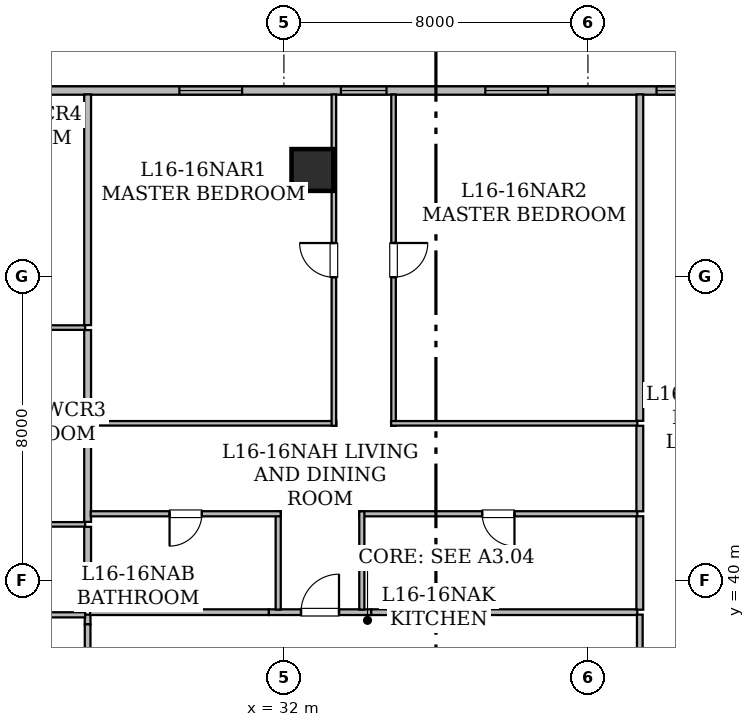
"""IFC4 building model, lengths in metres.
Left out: names, types, materials, properties, quantities, classifications, styles, units other than length and angle.
Written with IfcOpenShell. Run it as: python <this file> out.ifc"""

import sys

from ifc_helpers import new_model, si_unit, direction, frame, frame_2d, origin, origin_2d, place, context, subcontext, project, spatial, rectangle, hollow_rectangle, extrude, element, fill, save


model = new_model("IFC4")
c1 = context("Model", 3, precision=1e-05, world=origin(), true_north=direction((0.0, 1.0)))
c2 = subcontext(c1, "Body", "Model", "MODEL_VIEW")
j1 = project(units=[si_unit("LENGTHUNIT", "METRE"), si_unit("PLANEANGLEUNIT", "RADIAN")], contexts=[c1])
p1 = place(None, origin())
s1 = spatial("IfcSite", under=j1, at=p1, CompositionType="ELEMENT")
p2 = place(p1, origin())
s2 = spatial("IfcBuilding", under=s1, at=p2, CompositionType="ELEMENT")
p3 = place(p2, frame((0.0, 0.0, 66.15)))
s3 = spatial("IfcBuildingStorey", under=s2, at=p3, CompositionType="ELEMENT", Elevation=66.15)
p4 = place(p3, frame((32.75, 50.8, 0.0), z_axis=(0.0, 0.0, 1.0), x_axis=(1.0, 0.0, 0.0)))
e1 = element("IfcColumn", 1, at=p4, inside=s3, PredefinedType="COLUMN", context=c2, shape_type="SweptSolid", body=[
    extrude(hollow_rectangle(XDim=1.1, YDim=1.1, WallThickness=0.055, at=origin_2d()), origin(), (0.0, 0.0, 1.0), 3.65),
])
p5 = place(p3, frame((8.315, 52.89, 0.0), z_axis=(0.0, 0.0, 1.0), x_axis=(1.0, 0.0, 0.0)))
e2 = element("IfcWall", 2, at=p5, inside=s3, PredefinedType="STANDARD", context=c2, shape_type="SweptSolid", body=[
    extrude(rectangle(XDim=37.439, YDim=0.22, at=frame_2d((18.719, 0.0))), origin(), (0.0, 0.0, 1.0), 3.43),
])
p6 = place(p5, frame((5.093, 0.0, 0.85)))
e3 = element("IfcOpeningElement", 3, at=p6, cuts=e2, PredefinedType="OPENING", context=c2, shape_type="SweptSolid", body=[
    extrude(rectangle(XDim=1.65, YDim=1.55, at=frame_2d((0.825, 0.775))), frame((0.0, 0.12, 0.0), z_axis=(0.0, -1.0, 0.0), x_axis=(1.0, 0.0, 0.0)), (0.0, 0.0, 1.0), 0.24),
])
p7 = place(p5, frame((13.055, 0.0, 0.8)))
e4 = element("IfcOpeningElement", 4, at=p7, cuts=e2, PredefinedType="OPENING", context=c2, shape_type="SweptSolid", body=[
    extrude(rectangle(XDim=1.2, YDim=1.5, at=frame_2d((0.6, 0.75))), frame((0.0, 0.12, 0.0), z_axis=(0.0, -1.0, 0.0), x_axis=(1.0, 0.0, 0.0)), (0.0, 0.0, 1.0), 0.24),
])
p8 = place(p5, frame((10.005, 0.0, 0.85)))
e5 = element("IfcOpeningElement", 5, at=p8, cuts=e2, PredefinedType="OPENING", context=c2, shape_type="SweptSolid", body=[
    extrude(rectangle(XDim=1.65, YDim=1.55, at=frame_2d((0.825, 0.775))), frame((0.0, 0.12, 0.0), z_axis=(0.0, -1.0, 0.0), x_axis=(1.0, 0.0, 0.0)), (0.0, 0.0, 1.0), 0.24),
])
p9 = place(p5, frame((15.655, 0.0, 0.85)))
e6 = element("IfcOpeningElement", 6, at=p9, cuts=e2, PredefinedType="OPENING", context=c2, shape_type="SweptSolid", body=[
    extrude(rectangle(XDim=1.65, YDim=1.55, at=frame_2d((0.825, 0.775))), frame((0.0, 0.12, 0.0), z_axis=(0.0, -1.0, 0.0), x_axis=(1.0, 0.0, 0.0)), (0.0, 0.0, 1.0), 0.24),
])
p10 = place(p5, frame((25.185, 0.0, 0.8)))
e7 = element("IfcOpeningElement", 7, at=p10, cuts=e2, PredefinedType="OPENING", context=c2, shape_type="SweptSolid", body=[
    extrude(rectangle(XDim=1.2, YDim=1.5, at=frame_2d((0.6, 0.75))), frame((0.0, 0.12, 0.0), z_axis=(0.0, -1.0, 0.0), x_axis=(1.0, 0.0, 0.0)), (0.0, 0.0, 1.0), 0.24),
])
p11 = place(p5, frame((20.935, 0.0, 0.85)))
e8 = element("IfcOpeningElement", 8, at=p11, cuts=e2, PredefinedType="OPENING", context=c2, shape_type="SweptSolid", body=[
    extrude(rectangle(XDim=1.65, YDim=1.55, at=frame_2d((0.825, 0.775))), frame((0.0, 0.12, 0.0), z_axis=(0.0, -1.0, 0.0), x_axis=(1.0, 0.0, 0.0)), (0.0, 0.0, 1.0), 0.24),
])
p12 = place(p5, frame((28.985, 0.0, 0.85)))
e9 = element("IfcOpeningElement", 9, at=p12, cuts=e2, PredefinedType="OPENING", context=c2, shape_type="SweptSolid", body=[
    extrude(rectangle(XDim=1.65, YDim=1.55, at=frame_2d((0.825, 0.775))), frame((0.0, 0.12, 0.0), z_axis=(0.0, -1.0, 0.0), x_axis=(1.0, 0.0, 0.0)), (0.0, 0.0, 1.0), 0.24),
])
p13 = place(p5, frame((33.49, 0.0, 0.85)))
e10 = element("IfcOpeningElement", 10, at=p13, cuts=e2, PredefinedType="OPENING", context=c2, shape_type="SweptSolid", body=[
    extrude(rectangle(XDim=1.65, YDim=1.55, at=frame_2d((0.825, 0.775))), frame((0.0, 0.12, 0.0), z_axis=(0.0, -1.0, 0.0), x_axis=(1.0, 0.0, 0.0)), (0.0, 0.0, 1.0), 0.24),
])
p14 = place(p5, frame((35.942, 0.0, 0.85)))
e11 = element("IfcOpeningElement", 11, at=p14, cuts=e2, PredefinedType="OPENING", context=c2, shape_type="SweptSolid", body=[
    extrude(rectangle(XDim=1.35, YDim=1.5, at=frame_2d((0.675, 0.75))), frame((0.0, 0.12, 0.0), z_axis=(0.0, -1.0, 0.0), x_axis=(1.0, 0.0, 0.0)), (0.0, 0.0, 1.0), 0.24),
])
p15 = place(p3, frame((26.835, 38.846, 0.0), z_axis=(0.0, 0.0, 1.0), x_axis=(0.0, 1.0, 0.0)))
e12 = element("IfcWall", 12, at=p15, inside=s3, PredefinedType="STANDARD", context=c2, shape_type="SweptSolid", body=[
    extrude(rectangle(XDim=0.254, YDim=0.15, at=frame_2d((0.127, 0.0))), origin(), (0.0, 0.0, 1.0), 3.43),
])
p16 = place(p3, frame((26.835, 35.45, 0.0), z_axis=(0.0, 0.0, 1.0), x_axis=(0.0, 1.0, 0.0)))
e13 = element("IfcWall", 13, at=p16, inside=s3, PredefinedType="STANDARD", context=c2, shape_type="SweptSolid", body=[
    extrude(rectangle(XDim=3.396, YDim=0.15, at=frame_2d((1.698, 0.0))), origin(), (0.0, 0.0, 1.0), 2.647),
])
p17 = place(p3, frame((31.601, 39.165, 0.0), z_axis=(0.0, 0.0, 1.0), x_axis=(1.0, 0.0, 0.0)))
e14 = element("IfcWall", 14, at=p17, inside=s3, PredefinedType="STANDARD", context=c2, shape_type="SweptSolid", body=[
    extrude(rectangle(XDim=2.698, YDim=0.15, at=frame_2d((1.349, 0.0))), origin(), (0.0, 0.0, 1.0), 3.43),
])
p18 = place(p17, frame((0.849, 0.0, 0.0)))
e15 = element("IfcOpeningElement", 15, at=p18, cuts=e14, PredefinedType="OPENING", context=c2, shape_type="SweptSolid", body=[
    extrude(rectangle(XDim=1.0, YDim=2.15, at=frame_2d((0.5, 1.075))), frame((0.0, 0.085, 0.0), z_axis=(0.0, -1.0, 0.0), x_axis=(1.0, 0.0, 0.0)), (0.0, 0.0, 1.0), 0.17),
])
p19 = place(p3, frame((26.9, 39.165, 0.0), z_axis=(0.0, 0.0, 1.0), x_axis=(1.0, 0.0, 0.0)))
e16 = element("IfcWall", 16, at=p19, inside=s3, PredefinedType="STANDARD", context=c2, shape_type="SweptSolid", body=[
    extrude(rectangle(XDim=4.701, YDim=0.15, at=frame_2d((2.351, 0.0))), origin(), (0.0, 0.0, 1.0), 2.647),
])
p20 = place(p3, frame((34.299, 39.165, 0.0), z_axis=(0.0, 0.0, 1.0), x_axis=(1.0, 0.0, 0.0)))
e17 = element("IfcWall", 17, at=p20, inside=s3, PredefinedType="STANDARD", context=c2, shape_type="SweptSolid", body=[
    extrude(rectangle(XDim=7.001, YDim=0.15, at=frame_2d((3.5, 0.0))), origin(), (0.0, 0.0, 1.0), 3.43),
])
p21 = place(p3, frame((41.365, 39.1, 0.0), z_axis=(0.0, 0.0, 1.0), x_axis=(0.0, -1.0, 0.0)))
e18 = element("IfcWall", 18, at=p21, inside=s3, PredefinedType="STANDARD", context=c2, shape_type="SweptSolid", body=[
    extrude(rectangle(XDim=3.343, YDim=0.15, at=frame_2d((1.671, 0.0))), origin(), (0.0, 0.0, 1.0), 2.647),
])
p22 = place(p3, frame((26.77, 39.095, 0.0), z_axis=(0.0, 0.0, 1.0), x_axis=(-1.0, 0.0, 0.0)))
e19 = element("IfcWall", 19, at=p22, inside=s3, PredefinedType="PARTITIONING", context=c2, shape_type="SweptSolid", body=[
    extrude(rectangle(XDim=3.765, YDim=0.135, at=frame_2d((1.883, 0.0))), origin(), (0.0, 0.0, 1.0), 3.43),
])
p23 = place(p22, frame((1.458, 0.0, 0.0)))
e20 = element("IfcOpeningElement", 20, at=p23, cuts=e19, PredefinedType="OPENING", context=c2, shape_type="SweptSolid", body=[
    extrude(rectangle(XDim=0.85, YDim=2.1, at=frame_2d((0.425, 1.05))), frame((0.0, 0.077, 0.0), z_axis=(0.0, -1.0, 0.0), x_axis=(1.0, 0.0, 0.0)), (0.0, 0.0, 1.0), 0.155),
])
p24 = place(p3, frame((22.69, 41.475, 0.0), z_axis=(0.0, 0.0, 1.0), x_axis=(1.0, 0.0, 0.0)))
e21 = element("IfcWall", 21, at=p24, inside=s3, PredefinedType="PARTITIONING", context=c2, shape_type="SweptSolid", body=[
    extrude(rectangle(XDim=4.08, YDim=0.12, at=frame_2d((2.04, 0.0))), origin(), (0.0, 0.0, 1.0), 3.43),
])
p25 = place(p3, frame((26.835, 41.41, 0.0), z_axis=(0.0, 0.0, 1.0), x_axis=(0.0, -1.0, 0.0)))
e22 = element("IfcWall", 22, at=p25, inside=s3, PredefinedType="STANDARD", context=c2, shape_type="SweptSolid", body=[
    extrude(rectangle(XDim=2.18, YDim=0.18, at=frame_2d((1.09, 0.0))), origin(), (0.0, 0.0, 1.0), 3.43),
])
p26 = place(p3, frame((22.809, 46.653, 0.0), z_axis=(0.0, 0.0, 1.0), x_axis=(1.0, 0.0, 0.0)))
e23 = element("IfcWall", 23, at=p26, inside=s3, PredefinedType="PARTITIONING", context=c2, shape_type="SweptSolid", body=[
    extrude(rectangle(XDim=3.961, YDim=0.12, at=frame_2d((1.98, 0.0))), origin(), (0.0, 0.0, 1.0), 3.43),
])
p27 = place(p3, frame((26.835, 44.383, 0.0), z_axis=(0.0, 0.0, 1.0), x_axis=(0.0, -1.0, 0.0)))
e24 = element("IfcWall", 24, at=p27, inside=s3, PredefinedType="STANDARD", context=c2, shape_type="SweptSolid", body=[
    extrude(rectangle(XDim=2.843, YDim=0.18, at=frame_2d((1.421, 0.0))), origin(), (0.0, 0.0, 1.0), 3.065),
])
p28 = place(p3, frame((26.835, 46.588, 0.0), z_axis=(0.0, 0.0, 1.0), x_axis=(0.0, -1.0, 0.0)))
e25 = element("IfcWall", 25, at=p28, inside=s3, PredefinedType="STANDARD", context=c2, shape_type="SweptSolid", body=[
    extrude(rectangle(XDim=2.205, YDim=0.18, at=frame_2d((1.103, 0.0))), origin(), (0.0, 0.0, 1.0), 3.43),
])
p29 = place(p3, frame((26.835, 52.788, 0.0), z_axis=(0.0, 0.0, 1.0), x_axis=(0.0, -1.0, 0.0)))
e26 = element("IfcWall", 26, at=p29, inside=s3, PredefinedType="STANDARD", context=c2, shape_type="SweptSolid", body=[
    extrude(rectangle(XDim=6.07, YDim=0.18, at=frame_2d((3.035, 0.0))), origin(), (0.0, 0.0, 1.0), 2.803),
])
p30 = place(p3, frame((31.85, 39.232, 0.0), z_axis=(0.0, 0.0, 1.0), x_axis=(0.0, 1.0, 0.0)))
e27 = element("IfcWall", 27, at=p30, inside=s3, PredefinedType="PARTITIONING", context=c2, shape_type="SweptSolid", body=[
    extrude(rectangle(XDim=2.587, YDim=0.135, at=frame_2d((1.293, 0.0))), origin(), (0.0, 0.0, 1.0), 3.43),
])
p31 = place(p3, frame((31.915, 41.754, 0.0), z_axis=(0.0, 0.0, 1.0), x_axis=(-1.0, 0.0, 0.0)))
e28 = element("IfcWall", 28, at=p31, inside=s3, PredefinedType="PARTITIONING", context=c2, shape_type="SweptSolid", body=[
    extrude(rectangle(XDim=4.998, YDim=0.135, at=frame_2d((2.499, 0.0))), origin(), (0.0, 0.0, 1.0), 2.647),
])
p32 = place(p31, frame((2.074, 0.0, 0.0)))
e29 = element("IfcOpeningElement", 29, at=p32, cuts=e28, PredefinedType="OPENING", context=c2, shape_type="SweptSolid", body=[
    extrude(rectangle(XDim=0.85, YDim=2.1, at=frame_2d((0.425, 1.05))), frame((0.0, 0.077, 0.0), z_axis=(0.0, -1.0, 0.0), x_axis=(1.0, 0.0, 0.0)), (0.0, 0.0, 1.0), 0.155),
])
p33 = place(p3, frame((41.3, 41.754, 0.0), z_axis=(0.0, 0.0, 1.0), x_axis=(-1.0, 0.0, 0.0)))
e30 = element("IfcWall", 30, at=p33, inside=s3, PredefinedType="PARTITIONING", context=c2, shape_type="SweptSolid", body=[
    extrude(rectangle(XDim=7.315, YDim=0.135, at=frame_2d((3.657, 0.0))), origin(), (0.0, 0.0, 1.0), 3.43),
])
p34 = place(p33, frame((3.233, 0.0, 0.0)))
e31 = element("IfcOpeningElement", 31, at=p34, cuts=e30, PredefinedType="OPENING", context=c2, shape_type="SweptSolid", body=[
    extrude(rectangle(XDim=0.85, YDim=2.1, at=frame_2d((0.425, 1.05))), frame((0.0, 0.077, 0.0), z_axis=(0.0, -1.0, 0.0), x_axis=(1.0, 0.0, 0.0)), (0.0, 0.0, 1.0), 0.155),
])
p35 = place(p3, frame((34.05, 41.819, 0.0), z_axis=(0.0, 0.0, 1.0), x_axis=(0.0, -1.0, 0.0)))
e32 = element("IfcWall", 32, at=p35, inside=s3, PredefinedType="PARTITIONING", context=c2, shape_type="SweptSolid", body=[
    extrude(rectangle(XDim=2.587, YDim=0.135, at=frame_2d((1.293, 0.0))), origin(), (0.0, 0.0, 1.0), 3.43),
])
p36 = place(p3, frame((26.917, 44.134, 0.0), z_axis=(0.0, 0.0, 1.0), x_axis=(1.0, 0.0, 0.0)))
e33 = element("IfcWall", 33, at=p36, inside=s3, PredefinedType="PARTITIONING", context=c2, shape_type="SweptSolid", body=[
    extrude(rectangle(XDim=6.463, YDim=0.12, at=frame_2d((3.231, 0.0))), origin(), (0.0, 0.0, 1.0), 2.647),
])
p37 = place(p3, frame((33.315, 44.069, 0.0), z_axis=(0.0, 0.0, 1.0), x_axis=(0.0, 1.0, 0.0)))
e34 = element("IfcWall", 34, at=p37, inside=s3, PredefinedType="PARTITIONING", context=c2, shape_type="SweptSolid", body=[
    extrude(rectangle(XDim=8.719, YDim=0.12, at=frame_2d((4.359, 0.0))), origin(), (0.0, 0.0, 1.0), 2.803),
])
p38 = place(p37, frame((3.909, 0.0, 0.0)))
e35 = element("IfcOpeningElement", 35, at=p38, cuts=e34, PredefinedType="OPENING", context=c2, shape_type="SweptSolid", body=[
    extrude(rectangle(XDim=0.9, YDim=2.1, at=frame_2d((0.45, 1.05))), frame((0.0, 0.07, 0.0), z_axis=(0.0, -1.0, 0.0), x_axis=(1.0, 0.0, 0.0)), (0.0, 0.0, 1.0), 0.14),
])
p39 = place(p3, frame((34.885, 52.788, 0.0), z_axis=(0.0, 0.0, 1.0), x_axis=(0.0, -1.0, 0.0)))
e36 = element("IfcWall", 36, at=p39, inside=s3, PredefinedType="PARTITIONING", context=c2, shape_type="SweptSolid", body=[
    extrude(rectangle(XDim=8.719, YDim=0.12, at=frame_2d((4.359, 0.0))), origin(), (0.0, 0.0, 1.0), 2.803),
])
p40 = place(p39, frame((3.909, 0.0, 0.0)))
e37 = element("IfcOpeningElement", 37, at=p40, cuts=e36, PredefinedType="OPENING", context=c2, shape_type="SweptSolid", body=[
    extrude(rectangle(XDim=0.9, YDim=2.1, at=frame_2d((0.45, 1.05))), frame((0.0, 0.07, 0.0), z_axis=(0.0, -1.0, 0.0), x_axis=(1.0, 0.0, 0.0)), (0.0, 0.0, 1.0), 0.14),
])
p41 = place(p3, frame((34.82, 44.134, 0.0), z_axis=(0.0, 0.0, 1.0), x_axis=(1.0, 0.0, 0.0)))
e38 = element("IfcWall", 38, at=p41, inside=s3, PredefinedType="PARTITIONING", context=c2, shape_type="SweptSolid", body=[
    extrude(rectangle(XDim=6.48, YDim=0.12, at=frame_2d((3.24, 0.0))), origin(), (0.0, 0.0, 1.0), 3.43),
])
p42 = place(p3, frame((41.365, 44.069, 0.0), z_axis=(0.0, 0.0, 1.0), x_axis=(0.0, -1.0, 0.0)))
e39 = element("IfcWall", 39, at=p42, inside=s3, PredefinedType="STANDARD", context=c2, shape_type="SweptSolid", body=[
    extrude(rectangle(XDim=2.25, YDim=0.18, at=frame_2d((1.125, 0.0))), origin(), (0.0, 0.0, 1.0), 3.065),
])
p43 = place(p3, frame((41.365, 41.689, 0.0), z_axis=(0.0, 0.0, 1.0), x_axis=(0.0, -1.0, 0.0)))
e40 = element("IfcWall", 40, at=p43, inside=s3, PredefinedType="STANDARD", context=c2, shape_type="SweptSolid", body=[
    extrude(rectangle(XDim=2.459, YDim=0.18, at=frame_2d((1.229, 0.0))), origin(), (0.0, 0.0, 1.0), 3.43),
])
p44 = place(p3, frame((41.365, 52.788, 0.0), z_axis=(0.0, 0.0, 1.0), x_axis=(0.0, -1.0, 0.0)))
e41 = element("IfcWall", 41, at=p44, inside=s3, PredefinedType="STANDARD", context=c2, shape_type="SweptSolid", body=[
    extrude(rectangle(XDim=8.589, YDim=0.18, at=frame_2d((4.294, 0.0))), origin(), (0.0, 0.0, 1.0), 2.803),
])
p45 = place(p10, origin())
e42 = element("IfcWindow", 42, at=p45, inside=s3, PartitioningType="SINGLE_PANEL", PredefinedType="WINDOW", context=c2, shape_type="SweptSolid", body=[
    extrude(rectangle(XDim=1.2, YDim=1.5, at=frame_2d((0.6, 0.75))), frame((0.0, 0.03, 0.0), z_axis=(0.0, -1.0, 0.0), x_axis=(1.0, 0.0, 0.0)), (0.0, 0.0, 1.0), 0.06),
])
fill(e7, e42)
p46 = place(p11, origin())
e43 = element("IfcWindow", 43, at=p46, inside=s3, PartitioningType="SINGLE_PANEL", PredefinedType="WINDOW", context=c2, shape_type="SweptSolid", body=[
    extrude(rectangle(XDim=1.65, YDim=1.55, at=frame_2d((0.825, 0.775))), frame((0.0, 0.03, 0.0), z_axis=(0.0, -1.0, 0.0), x_axis=(1.0, 0.0, 0.0)), (0.0, 0.0, 1.0), 0.06),
])
fill(e8, e43)
p47 = place(p12, origin())
e44 = element("IfcWindow", 44, at=p47, inside=s3, PartitioningType="SINGLE_PANEL", PredefinedType="WINDOW", context=c2, shape_type="SweptSolid", body=[
    extrude(rectangle(XDim=1.65, YDim=1.55, at=frame_2d((0.825, 0.775))), frame((0.0, 0.03, 0.0), z_axis=(0.0, -1.0, 0.0), x_axis=(1.0, 0.0, 0.0)), (0.0, 0.0, 1.0), 0.06),
])
fill(e9, e44)
p48 = place(p13, origin())
e45 = element("IfcWindow", 45, at=p48, inside=s3, PartitioningType="SINGLE_PANEL", PredefinedType="WINDOW", context=c2, shape_type="SweptSolid", body=[
    extrude(rectangle(XDim=1.65, YDim=1.55, at=frame_2d((0.825, 0.775))), frame((0.0, 0.03, 0.0), z_axis=(0.0, -1.0, 0.0), x_axis=(1.0, 0.0, 0.0)), (0.0, 0.0, 1.0), 0.06),
])
fill(e10, e45)
p49 = place(p18, origin())
e46 = element("IfcDoor", 46, at=p49, inside=s3, OperationType="SINGLE_SWING_RIGHT", PredefinedType="DOOR", context=c2, shape_type="SweptSolid", body=[
    extrude(rectangle(XDim=1.0, YDim=2.15, at=frame_2d((0.5, 1.075))), frame((0.0, 0.025, 0.0), z_axis=(0.0, -1.0, 0.0), x_axis=(1.0, 0.0, 0.0)), (0.0, 0.0, 1.0), 0.05),
])
fill(e15, e46)
p50 = place(p32, origin())
e47 = element("IfcDoor", 47, at=p50, inside=s3, OperationType="SINGLE_SWING_RIGHT", PredefinedType="DOOR", context=c2, shape_type="SweptSolid", body=[
    extrude(rectangle(XDim=0.85, YDim=2.1, at=frame_2d((0.425, 1.05))), frame((0.0, 0.025, 0.0), z_axis=(0.0, -1.0, 0.0), x_axis=(1.0, 0.0, 0.0)), (0.0, 0.0, 1.0), 0.05),
])
fill(e29, e47)
p51 = place(p34, origin())
e48 = element("IfcDoor", 48, at=p51, inside=s3, OperationType="SINGLE_SWING_LEFT", PredefinedType="DOOR", context=c2, shape_type="SweptSolid", body=[
    extrude(rectangle(XDim=0.85, YDim=2.1, at=frame_2d((0.425, 1.05))), frame((0.0, 0.025, 0.0), z_axis=(0.0, -1.0, 0.0), x_axis=(1.0, 0.0, 0.0)), (0.0, 0.0, 1.0), 0.05),
])
fill(e31, e48)
p52 = place(p38, origin())
e49 = element("IfcDoor", 49, at=p52, inside=s3, OperationType="SINGLE_SWING_RIGHT", PredefinedType="DOOR", context=c2, shape_type="SweptSolid", body=[
    extrude(rectangle(XDim=0.9, YDim=2.1, at=frame_2d((0.45, 1.05))), frame((0.0, 0.025, 0.0), z_axis=(0.0, -1.0, 0.0), x_axis=(1.0, 0.0, 0.0)), (0.0, 0.0, 1.0), 0.05),
])
fill(e35, e49)
p53 = place(p40, origin())
e50 = element("IfcDoor", 50, at=p53, inside=s3, OperationType="SINGLE_SWING_LEFT", PredefinedType="DOOR", context=c2, shape_type="SweptSolid", body=[
    extrude(rectangle(XDim=0.9, YDim=2.1, at=frame_2d((0.45, 1.05))), frame((0.0, 0.025, 0.0), z_axis=(0.0, -1.0, 0.0), x_axis=(1.0, 0.0, 0.0)), (0.0, 0.0, 1.0), 0.05),
])
fill(e37, e50)
save(model, sys.argv[1])
